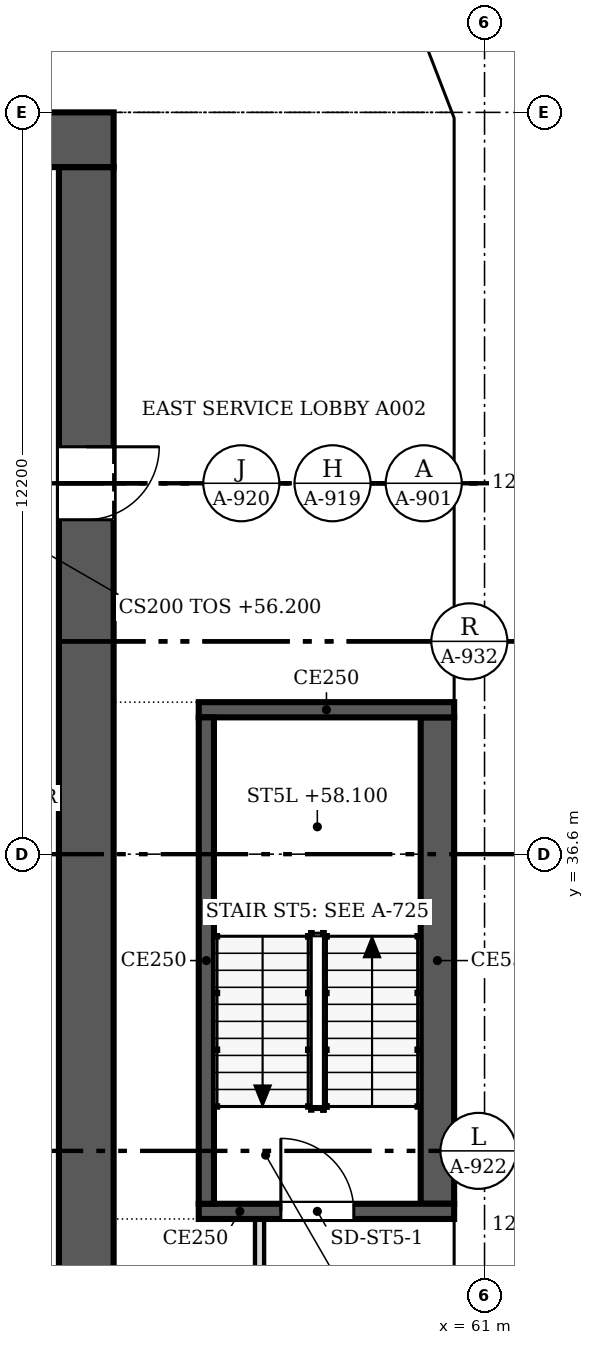
"""IFC4 building model, lengths in metres.
Left out: names, types, materials, properties, quantities, classifications, styles, units other than length and angle.
Written with IfcOpenShell. Run it as: python <this file> out.ifc"""

import sys

from ifc_helpers import new_model, si_unit, direction, frame, frame_2d, origin, place, context, subcontext, project, spatial, polyline, rectangle, outline, extrude, faceted_brep, source, transform, mapped, element, fill, save


model = new_model("IFC4")
c1 = context("Model", 3, precision=1e-05, world=origin(), true_north=direction((0.0, 1.0)))
c2 = subcontext(c1, "Body", "Model", "MODEL_VIEW")
j1 = project(units=[si_unit("LENGTHUNIT", "METRE"), si_unit("PLANEANGLEUNIT", "RADIAN")], contexts=[c1])
p1 = place(None, origin())
s1 = spatial("IfcSite", under=j1, at=p1, CompositionType="ELEMENT")
p2 = place(p1, origin())
s2 = spatial("IfcBuilding", under=s1, at=p2, CompositionType="ELEMENT")
p3 = place(p2, frame((0.0, 0.0, 56.2)))
s3 = spatial("IfcBuildingStorey", under=s2, at=p3, CompositionType="ELEMENT", Elevation=56.2)
m1 = source(origin(), c2, "Body", "SweptSolid", [
    extrude(outline(polyline([(3.05, 0.0), (6.1, 3.8), (3.05, 7.6), (0.0, 3.8), (3.05, 0.0)])), frame((0.0, 0.25, 0.0), z_axis=(0.0, -1.0, 0.0), x_axis=(1.0, 0.0, 0.0)), (0.0, 0.0, 1.0), 0.5),
])
p4 = place(p3, frame((60.75, 24.4, -3.8), z_axis=(0.0, 0.0, 1.0), x_axis=(0.0, 1.0, 0.0)))
e1 = element("IfcWall", 1, at=p4, inside=s3, PredefinedType="SOLIDWALL", context=c2, shape_type="MappedRepresentation", body=[
    mapped(m1, transform((0.0, 0.0, 0.0), scale=1.0)),
])
m2 = source(origin(), c2, "Body", "SweptSolid", [
    extrude(outline(polyline([(3.05, 0.399), (5.78, 3.8), (3.05, 7.201), (0.321, 3.8), (3.05, 0.399)])), frame((0.0, 0.26, 0.0), z_axis=(0.0, -1.0, 0.0), x_axis=(1.0, 0.0, 0.0)), (0.0, 0.0, 1.0), 0.52),
])
p5 = place(p4, origin())
e2 = element("IfcOpeningElement", 2, at=p5, cuts=e1, PredefinedType="OPENING", context=c2, shape_type="MappedRepresentation", body=[
    mapped(m2, transform((0.0, 0.0, 0.0), scale=1.0)),
])
p6 = place(p3, frame((60.75, 30.5, -3.8), z_axis=(0.0, 0.0, 1.0), x_axis=(0.0, 1.0, 0.0)))
e3 = element("IfcWall", 3, at=p6, inside=s3, PredefinedType="SOLIDWALL", context=c2, shape_type="MappedRepresentation", body=[
    mapped(m1, transform((0.0, 0.0, 0.0), scale=1.0)),
])
p7 = place(p6, origin())
e4 = element("IfcOpeningElement", 4, at=p7, cuts=e3, PredefinedType="OPENING", context=c2, shape_type="MappedRepresentation", body=[
    mapped(m2, transform((0.0, 0.0, 0.0), scale=1.0)),
])
m3 = source(origin(), c2, "Body", "Brep", [
    faceted_brep([(3.05, -0.25, 0.0), (6.1, -0.25, 3.8), (6.1, -0.25, 3.8), (3.05, -0.25, 7.6), (0.0, -0.25, 3.8), (0.0, 0.25, 3.8), (3.05, 0.25, 7.6), (6.1, 0.25, 3.8), (6.1, 0.25, 3.8), (3.05, 0.25, 0.0)], [[[0, 1, 2, 3, 4]], [[5, 6, 7, 8, 9]], [[9, 8, 1, 0]], [[7, 6, 3, 2]], [[6, 5, 4, 3]], [[5, 9, 0, 4]], [[1, 8, 7, 2]]]),
])
p8 = place(p3, frame((60.75, 36.6, -3.8), z_axis=(0.0, 0.0, 1.0), x_axis=(0.0, 1.0, 0.0)))
e5 = element("IfcWall", 5, at=p8, inside=s3, PredefinedType="SOLIDWALL", context=c2, shape_type="MappedRepresentation", body=[
    mapped(m3, transform((0.0, 0.0, 0.0), scale=1.0)),
])
p9 = place(p8, origin())
e6 = element("IfcOpeningElement", 6, at=p9, cuts=e5, PredefinedType="OPENING", context=c2, shape_type="MappedRepresentation", body=[
    mapped(m2, transform((0.0, 0.0, 0.0), scale=1.0)),
])
m4 = source(origin(), c2, "Body", "Brep", [
    faceted_brep([(3.05, -0.25, 0.0), (6.053, -0.25, 3.8), (3.05, -0.25, 7.6), (0.0, -0.25, 3.8), (0.0, 0.25, 3.8), (3.05, 0.25, 7.6), (6.007, 0.25, 3.859), (6.007, 0.25, 3.741), (3.05, 0.25, 0.0), (6.053, 0.0, 3.8)], [[[0, 1, 2, 3]], [[4, 5, 6, 7, 8]], [[8, 7, 9, 1, 0]], [[6, 5, 2, 1, 9]], [[5, 4, 3, 2]], [[4, 8, 0, 3]], [[9, 7, 6]]]),
])
p10 = place(p3, frame((60.75, 42.7, -3.8), z_axis=(0.0, 0.0, 1.0), x_axis=(0.0, 1.0, 0.0)))
e7 = element("IfcWall", 7, at=p10, inside=s3, PredefinedType="SOLIDWALL", context=c2, shape_type="MappedRepresentation", body=[
    mapped(m4, transform((0.0, 0.0, 0.0), scale=1.0)),
])
m5 = source(origin(), c2, "Body", "SweptSolid", [
    extrude(outline(polyline([(3.049, 0.401), (5.735, 3.8), (3.049, 7.199), (0.321, 3.8), (3.049, 0.401)])), frame((0.0, 0.26, 0.0), z_axis=(0.0, -1.0, 0.0), x_axis=(1.0, 0.0, 0.0)), (0.0, 0.0, 1.0), 0.52),
])
p11 = place(p10, origin())
e8 = element("IfcOpeningElement", 8, at=p11, cuts=e7, PredefinedType="OPENING", context=c2, shape_type="MappedRepresentation", body=[
    mapped(m5, transform((0.0, 0.0, 0.0), scale=1.0)),
])
m6 = source(origin(), c2, "Body", "Brep", [
    faceted_brep([(2.95, -0.25, 0.0), (3.003, -0.25, 0.068), (3.003, -0.25, 7.532), (2.95, -0.25, 7.6), (0.0, -0.25, 3.8), (0.047, 0.25, 3.86), (2.898, 0.25, 7.532), (2.898, 0.25, 0.068), (0.047, 0.25, 3.74), (2.95, 0.0, 0.0), (2.95, 0.0, 7.6), (0.0, 0.0, 3.8)], [[[0, 1, 2, 3, 4]], [[5, 6, 7, 8]], [[1, 0, 9]], [[10, 3, 2]], [[6, 5, 11, 4, 3, 10]], [[8, 7, 9, 0, 4, 11]], [[8, 11, 5]], [[1, 9, 7, 6, 10, 2]]]),
])
p12 = place(p3, frame((60.75, 48.753, -3.8), z_axis=(0.0, 0.0, 1.0), x_axis=(-0.35992665181, 0.932980602862, 0.0)))
e9 = element("IfcWall", 9, at=p12, inside=s3, PredefinedType="SOLIDWALL", context=c2, shape_type="MappedRepresentation", body=[
    mapped(m6, transform((0.0, 0.0, 0.0), scale=1.0)),
])
m7 = source(origin(), c2, "Body", "SweptSolid", [
    extrude(outline(polyline([(2.75, 6.935), (0.316, 3.8), (2.75, 0.665), (2.75, 6.935)])), frame((0.0, 0.26, 0.0), z_axis=(0.0, -1.0, 0.0), x_axis=(1.0, 0.0, 0.0)), (0.0, 0.0, 1.0), 0.52),
])
p13 = place(p12, origin())
e10 = element("IfcOpeningElement", 10, at=p13, cuts=e9, PredefinedType="OPENING", context=c2, shape_type="MappedRepresentation", body=[
    mapped(m7, transform((0.0, 0.0, 0.0), scale=1.0)),
])
p14 = place(p2, frame((0.0, 0.0, 60.0)))
s4 = spatial("IfcBuildingStorey", under=s2, at=p14, CompositionType="ELEMENT", Elevation=60.0)
p15 = place(p14, frame((60.75, 27.45, -3.8), z_axis=(0.0, 0.0, 1.0), x_axis=(0.0, 1.0, 0.0)))
e11 = element("IfcWall", 11, at=p15, inside=s4, PredefinedType="SOLIDWALL", context=c2, shape_type="MappedRepresentation", body=[
    mapped(m1, transform((0.0, 0.0, 0.0), scale=1.0)),
])
p16 = place(p15, origin())
e12 = element("IfcOpeningElement", 12, at=p16, cuts=e11, PredefinedType="OPENING", context=c2, shape_type="MappedRepresentation", body=[
    mapped(m2, transform((0.0, 0.0, 0.0), scale=1.0)),
])
p17 = place(p14, frame((60.75, 33.55, -3.8), z_axis=(0.0, 0.0, 1.0), x_axis=(0.0, 1.0, 0.0)))
e13 = element("IfcWall", 13, at=p17, inside=s4, PredefinedType="SOLIDWALL", context=c2, shape_type="MappedRepresentation", body=[
    mapped(m3, transform((0.0, 0.0, 0.0), scale=1.0)),
])
p18 = place(p17, origin())
e14 = element("IfcOpeningElement", 14, at=p18, cuts=e13, PredefinedType="OPENING", context=c2, shape_type="MappedRepresentation", body=[
    mapped(m2, transform((0.0, 0.0, 0.0), scale=1.0)),
])
p19 = place(p14, frame((60.75, 39.65, -3.8), z_axis=(0.0, 0.0, 1.0), x_axis=(0.0, 1.0, 0.0)))
e15 = element("IfcWall", 15, at=p19, inside=s4, PredefinedType="SOLIDWALL", context=c2, shape_type="MappedRepresentation", body=[
    mapped(m1, transform((0.0, 0.0, 0.0), scale=1.0)),
])
p20 = place(p19, origin())
e16 = element("IfcOpeningElement", 16, at=p20, cuts=e15, PredefinedType="OPENING", context=c2, shape_type="MappedRepresentation", body=[
    mapped(m2, transform((0.0, 0.0, 0.0), scale=1.0)),
])
m8 = source(origin(), c2, "Body", "Brep", [
    faceted_brep([(3.003, -0.25, 0.0), (3.05, -0.25, 0.06), (3.05, -0.25, 7.54), (3.003, -0.25, 7.6), (0.0, -0.25, 3.8), (0.0, 0.25, 3.8), (2.957, 0.25, 7.541), (2.957, 0.25, 0.059), (3.003, 0.0, 0.0), (3.003, 0.0, 7.6)], [[[0, 1, 2, 3, 4]], [[5, 6, 7]], [[1, 0, 8]], [[9, 3, 2]], [[6, 5, 4, 3, 9]], [[5, 7, 8, 0, 4]], [[1, 8, 7, 6, 9, 2]]]),
])
p21 = place(p14, frame((60.75, 45.75, -3.8), z_axis=(0.0, 0.0, 1.0), x_axis=(0.0, 1.0, 0.0)))
e17 = element("IfcWall", 17, at=p21, inside=s4, PredefinedType="SOLIDWALL", context=c2, shape_type="MappedRepresentation", body=[
    mapped(m8, transform((0.0, 0.0, 0.0), scale=1.0)),
])
m9 = source(origin(), c2, "Body", "SweptSolid", [
    extrude(outline(polyline([(2.803, 6.944), (0.319, 3.8), (2.803, 0.656), (2.803, 6.944)])), frame((0.0, 0.26, 0.0), z_axis=(0.0, -1.0, 0.0), x_axis=(1.0, 0.0, 0.0)), (0.0, 0.0, 1.0), 0.52),
])
p22 = place(p21, origin())
e18 = element("IfcOpeningElement", 18, at=p22, cuts=e17, PredefinedType="OPENING", context=c2, shape_type="MappedRepresentation", body=[
    mapped(m9, transform((0.0, 0.0, 0.0), scale=1.0)),
])
m10 = source(origin(), c2, "Body", "Brep", [
    faceted_brep([(0.047, -0.25, 0.0), (2.997, -0.25, 3.8), (0.047, -0.25, 7.6), (0.0, -0.25, 7.541), (0.0, -0.25, 0.059), (0.093, 0.25, 7.54), (2.944, 0.25, 3.868), (2.944, 0.25, 3.732), (0.093, 0.25, 0.06), (2.997, 0.0, 3.8), (0.047, 0.0, 0.0), (0.047, 0.0, 7.6)], [[[0, 1, 2, 3, 4]], [[5, 6, 7, 8]], [[8, 7, 9, 1, 0, 10]], [[6, 5, 11, 2, 1, 9]], [[3, 2, 11]], [[10, 0, 4]], [[8, 10, 4, 3, 11, 5]], [[9, 7, 6]]]),
])
p23 = place(p14, frame((60.767, 48.71, -3.8), z_axis=(0.0, 0.0, 1.0), x_axis=(-0.359901446078, 0.932990326376, 0.0)))
e19 = element("IfcWall", 19, at=p23, inside=s4, PredefinedType="SOLIDWALL", context=c2, shape_type="MappedRepresentation", body=[
    mapped(m10, transform((0.0, 0.0, 0.0), scale=1.0)),
])
m11 = source(origin(), c2, "Body", "SweptSolid", [
    extrude(outline(polyline([(0.247, 0.665), (2.681, 3.8), (0.247, 6.935), (0.247, 0.665)])), frame((0.0, 0.26, 0.0), z_axis=(0.0, -1.0, 0.0), x_axis=(1.0, 0.0, 0.0)), (0.0, 0.0, 1.0), 0.52),
])
p24 = place(p23, origin())
e20 = element("IfcOpeningElement", 20, at=p24, cuts=e19, PredefinedType="OPENING", context=c2, shape_type="MappedRepresentation", body=[
    mapped(m11, transform((0.0, 0.0, 0.0), scale=1.0)),
])
p25 = place(p3, frame((30.5, 48.35, 0.0), z_axis=(0.0, 0.0, 1.0), x_axis=(1.0, 0.0, 0.0)))
e21 = element("IfcWall", 21, at=p25, inside=s3, PredefinedType="SHEAR", context=c2, shape_type="SweptSolid", body=[
    extrude(rectangle(XDim=24.4, YDim=0.9, at=frame_2d((12.2, 0.0))), origin(), (0.0, 0.0, 1.0), 3.8),
])
p26 = place(p3, frame((54.45, 47.9, 0.0), z_axis=(0.0, 0.0, 1.0), x_axis=(0.0, -1.0, 0.0)))
e22 = element("IfcWall", 22, at=p26, inside=s3, PredefinedType="SHEAR", context=c2, shape_type="SweptSolid", body=[
    extrude(rectangle(XDim=22.6, YDim=0.9, at=frame_2d((11.3, 0.0))), origin(), (0.0, 0.0, 1.0), 3.8),
])
m12 = source(origin(), c2, "Body", "SweptSolid", [
    extrude(rectangle(XDim=1.2, YDim=2.1, at=frame_2d((0.6, 1.05))), frame((0.0, 0.46, 0.0), z_axis=(0.0, -1.0, 0.0), x_axis=(1.0, 0.0, 0.0)), (0.0, 0.0, 1.0), 0.92),
])
p27 = place(p26, frame((4.6, 0.0, 0.0)))
e23 = element("IfcOpeningElement", 23, at=p27, cuts=e22, PredefinedType="OPENING", context=c2, shape_type="MappedRepresentation", body=[
    mapped(m12, transform((0.0, 0.0, 0.0), scale=1.0)),
])
p28 = place(p3, frame((60.5, 30.725, 0.0), z_axis=(0.0, 0.0, 1.0), x_axis=(-1.0, 0.0, 0.0)))
e24 = element("IfcWall", 24, at=p28, inside=s3, PredefinedType="SOLIDWALL", context=c2, shape_type="SweptSolid", body=[
    extrude(rectangle(XDim=4.2, YDim=0.25, at=frame_2d((2.1, 0.0))), origin(), (0.0, 0.0, 1.0), 3.8),
])
m13 = source(origin(), c2, "Body", "SweptSolid", [
    extrude(rectangle(XDim=1.2, YDim=2.1, at=frame_2d((0.6, 1.05))), frame((0.0, 0.135, 0.0), z_axis=(0.0, -1.0, 0.0), x_axis=(1.0, 0.0, 0.0)), (0.0, 0.0, 1.0), 0.27),
])
p29 = place(p28, frame((1.65, 0.0, 0.0)))
e25 = element("IfcOpeningElement", 25, at=p29, cuts=e24, PredefinedType="OPENING", context=c2, shape_type="MappedRepresentation", body=[
    mapped(m13, transform((0.0, 0.0, 0.0), scale=1.0)),
])
p30 = place(p3, frame((56.425, 30.85, 0.0), z_axis=(0.0, 0.0, 1.0), x_axis=(0.0, 1.0, 0.0)))
e26 = element("IfcWall", 26, at=p30, inside=s3, PredefinedType="SOLIDWALL", context=c2, shape_type="SweptSolid", body=[
    extrude(rectangle(XDim=8.0, YDim=0.25, at=frame_2d((4.0, 0.0))), origin(), (0.0, 0.0, 1.0), 3.8),
])
p31 = place(p3, frame((56.3, 38.975, 0.0), z_axis=(0.0, 0.0, 1.0), x_axis=(1.0, 0.0, 0.0)))
e27 = element("IfcWall", 27, at=p31, inside=s3, PredefinedType="SOLIDWALL", context=c2, shape_type="SweptSolid", body=[
    extrude(rectangle(XDim=4.2, YDim=0.25, at=frame_2d((2.1, 0.0))), origin(), (0.0, 0.0, 1.0), 3.8),
])
p32 = place(p3, frame((60.225, 38.85, 0.0), z_axis=(0.0, 0.0, 1.0), x_axis=(0.0, -1.0, 0.0)))
e28 = element("IfcWall", 28, at=p32, inside=s3, PredefinedType="SOLIDWALL", context=c2, shape_type="SweptSolid", body=[
    extrude(rectangle(XDim=8.0, YDim=0.55, at=frame_2d((4.0, 0.0))), origin(), (0.0, 0.0, 1.0), 3.8),
])
p33 = place(p3, frame((57.3, 30.6, 0.0), z_axis=(0.0, 0.0, 1.0), x_axis=(0.0, -1.0, 0.0)))
e29 = element("IfcWall", 29, at=p33, inside=s3, PredefinedType="PARTITIONING", context=c2, shape_type="SweptSolid", body=[
    extrude(rectangle(XDim=8.6, YDim=0.15, at=frame_2d((4.3, 0.0))), origin(), (0.0, 0.0, 1.0), 3.067),
])
m14 = source(origin(), c2, "Body", "SweptSolid", [
    extrude(rectangle(XDim=0.9, YDim=2.1, at=frame_2d((0.45, 1.05))), frame((0.0, 0.085, 0.0), z_axis=(0.0, -1.0, 0.0), x_axis=(1.0, 0.0, 0.0)), (0.0, 0.0, 1.0), 0.17),
])
p34 = place(p33, frame((3.9, 0.0, 0.0)))
e30 = element("IfcOpeningElement", 30, at=p34, cuts=e29, PredefinedType="OPENING", context=c2, shape_type="MappedRepresentation", body=[
    mapped(m14, transform((0.0, 0.0, 0.0), scale=1.0)),
])
m15 = source(origin(), c2, "Body", "SweptSolid", [
    extrude(rectangle(XDim=1.2, YDim=2.1, at=frame_2d((0.6, 1.05))), frame((0.0, 0.025, 0.0), z_axis=(0.0, -1.0, 0.0), x_axis=(1.0, 0.0, 0.0)), (0.0, 0.0, 1.0), 0.05),
])
p35 = place(p27, origin())
e31 = element("IfcDoor", 31, at=p35, inside=s3, OperationType="SINGLE_SWING_LEFT", PredefinedType="DOOR", context=c2, shape_type="MappedRepresentation", body=[
    mapped(m15, transform((0.0, 0.0, 0.0), scale=1.0)),
])
fill(e23, e31)
p36 = place(p29, origin())
e32 = element("IfcDoor", 32, at=p36, inside=s3, OperationType="SINGLE_SWING_RIGHT", PredefinedType="DOOR", context=c2, shape_type="MappedRepresentation", body=[
    mapped(m15, transform((0.0, 0.0, 0.0), scale=1.0)),
])
fill(e25, e32)
save(model, sys.argv[1])
